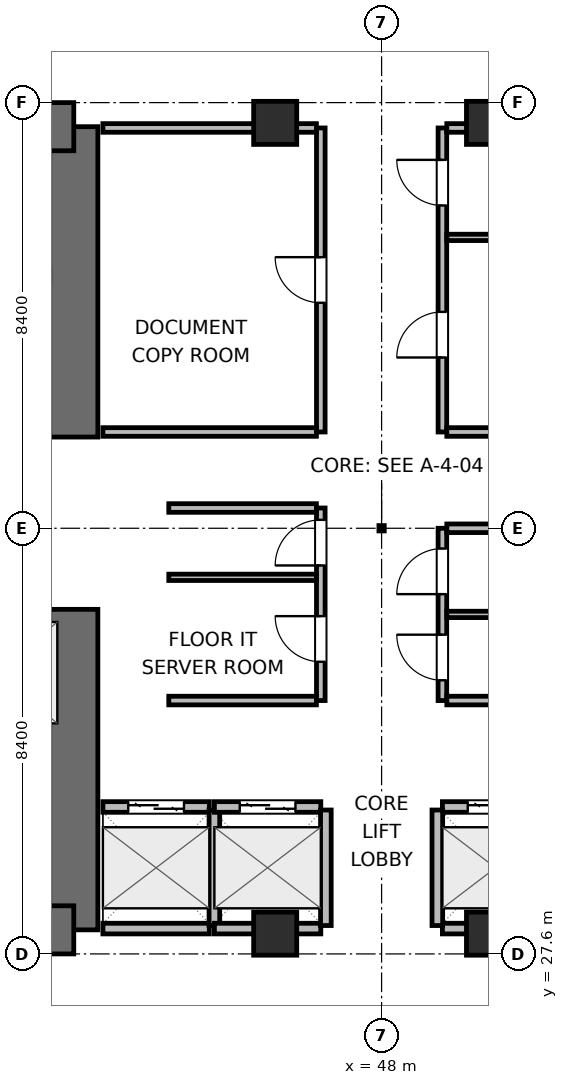
"""IFC4 building model, lengths in metres.
Left out: names, types, materials, properties, quantities, classifications, styles, units other than length and angle.
Written with IfcOpenShell. Run it as: python <this file> out.ifc"""

import sys

from ifc_helpers import new_model, si_unit, direction, frame, frame_2d, origin, origin_2d, place, context, subcontext, project, spatial, rectangle, extrude, element, fill, save


model = new_model("IFC4")
c1 = context("Model", 3, precision=1e-05, world=origin(), true_north=direction((0.0, 1.0)))
c2 = subcontext(c1, "Body", "Model", "MODEL_VIEW")
j1 = project(units=[si_unit("LENGTHUNIT", "METRE"), si_unit("PLANEANGLEUNIT", "RADIAN")], contexts=[c1])
p1 = place(None, origin())
s1 = spatial("IfcSite", under=j1, at=p1, CompositionType="ELEMENT")
p2 = place(p1, origin())
s2 = spatial("IfcBuilding", under=s1, at=p2, CompositionType="ELEMENT")
p3 = place(p2, frame((0.0, 0.0, 45.0)))
s3 = spatial("IfcBuildingStorey", under=s2, at=p3, CompositionType="ELEMENT", Elevation=45.0)
p4 = place(p3, frame((41.925, 28.075, 0.0), z_axis=(0.0, 0.0, 1.0), x_axis=(0.0, 1.0, 0.0)))
e1 = element("IfcWall", 1, at=p4, inside=s3, PredefinedType="SHEAR", context=c2, shape_type="SweptSolid", body=[
    extrude(rectangle(XDim=6.325, YDim=0.95, at=frame_2d((3.163, 0.0))), origin(), (0.0, 0.0, 1.0), 3.9),
])
p5 = place(p3, frame((41.925, 37.8, 0.0), z_axis=(0.0, 0.0, 1.0), x_axis=(0.0, 1.0, 0.0)))
e2 = element("IfcWall", 2, at=p5, inside=s3, PredefinedType="SHEAR", context=c2, shape_type="SweptSolid", body=[
    extrude(rectangle(XDim=6.125, YDim=0.95, at=frame_2d((3.062, 0.0))), origin(), (0.0, 0.0, 1.0), 3.9),
])
p6 = place(p3, frame((32.875, 28.075, 0.0), z_axis=(0.0, 0.0, 1.0), x_axis=(1.0, 0.0, 0.0)))
e3 = element("IfcWall", 3, at=p6, inside=s3, PredefinedType="SHEAR", context=c2, shape_type="SweptSolid", body=[
    extrude(rectangle(XDim=9.05, YDim=0.95, at=frame_2d((4.525, 0.0))), origin(), (0.0, 0.0, 1.0), 3.9),
])
p7 = place(p6, frame((4.975, 0.0, 0.0)))
e4 = element("IfcOpeningElement", 4, at=p7, cuts=e3, PredefinedType="OPENING", context=c2, shape_type="SweptSolid", body=[
    extrude(rectangle(XDim=1.05, YDim=2.04, at=frame_2d((0.525, 1.02))), frame((0.0, 0.485, 0.0), z_axis=(0.0, -1.0, 0.0), x_axis=(1.0, 0.0, 0.0)), (0.0, 0.0, 1.0), 0.97),
])
p8 = place(p3, frame((32.875, 43.925, 0.0), z_axis=(0.0, 0.0, 1.0), x_axis=(1.0, 0.0, 0.0)))
e5 = element("IfcWall", 5, at=p8, inside=s3, PredefinedType="SHEAR", context=c2, shape_type="SweptSolid", body=[
    extrude(rectangle(XDim=9.05, YDim=0.95, at=frame_2d((4.525, 0.0))), origin(), (0.0, 0.0, 1.0), 3.9),
])
p9 = place(p8, frame((0.975, 0.0, 0.0)))
e6 = element("IfcOpeningElement", 6, at=p9, cuts=e5, PredefinedType="OPENING", context=c2, shape_type="SweptSolid", body=[
    extrude(rectangle(XDim=0.95, YDim=2.04, at=frame_2d((0.475, 1.02))), frame((0.0, 0.485, 0.0), z_axis=(0.0, -1.0, 0.0), x_axis=(1.0, 0.0, 0.0)), (0.0, 0.0, 1.0), 0.97),
])
p10 = place(p8, frame((4.225, 0.0, 0.0)))
e7 = element("IfcOpeningElement", 7, at=p10, cuts=e5, PredefinedType="OPENING", context=c2, shape_type="SweptSolid", body=[
    extrude(rectangle(XDim=0.9, YDim=2.02, at=frame_2d((0.45, 1.01))), frame((0.0, 0.485, 0.0), z_axis=(0.0, -1.0, 0.0), x_axis=(1.0, 0.0, 0.0)), (0.0, 0.0, 1.0), 0.97),
])
p11 = place(p8, frame((7.125, 0.0, 0.0)))
e8 = element("IfcOpeningElement", 8, at=p11, cuts=e5, PredefinedType="OPENING", context=c2, shape_type="SweptSolid", body=[
    extrude(rectangle(XDim=0.9, YDim=2.02, at=frame_2d((0.45, 1.01))), frame((0.0, 0.485, 0.0), z_axis=(0.0, -1.0, 0.0), x_axis=(1.0, 0.0, 0.0)), (0.0, 0.0, 1.0), 0.97),
])
for number, where, z_axis, x_axis in (
    (9, (45.9, 28.0, 0.0), (0.0, 0.0, 1.0), (1.0, 0.0, 0.0)),
    (10, (50.1, 28.0, 0.0), (0.0, 0.0, 1.0), (1.0, 0.0, 0.0)),
    (11, (45.9, 44.0, 0.0), (0.0, 0.0, 1.0), (1.0, 0.0, 0.0)),
    (12, (50.1, 44.0, 0.0), (0.0, 0.0, 1.0), (1.0, 0.0, 0.0)),
):
    element("IfcColumn", number, at=place(p3, frame(where, z_axis=z_axis, x_axis=x_axis)), inside=s3, PredefinedType="COLUMN", context=c2, shape_type="SweptSolid", body=[
        extrude(rectangle(XDim=0.85, YDim=0.85, at=origin_2d()), origin(), (0.0, 0.0, 1.0), 3.9),
    ])
p12 = place(p3, frame((42.5, 30.5, 0.0), z_axis=(0.0, 0.0, 1.0), x_axis=(1.0, 0.0, 0.0)))
e13 = element("IfcWall", 13, at=p12, inside=s3, PredefinedType="PARTITIONING", context=c2, shape_type="SweptSolid", body=[
    extrude(rectangle(XDim=2.1, YDim=0.21, at=frame_2d((1.05, 0.0))), origin(), (0.0, 0.0, 1.0), 3.64),
])
p13 = place(p12, frame((0.5, 0.0, 0.0)))
e14 = element("IfcOpeningElement", 14, at=p13, cuts=e13, PredefinedType="OPENING", context=c2, shape_type="SweptSolid", body=[
    extrude(rectangle(XDim=1.1, YDim=2.04, at=frame_2d((0.55, 1.02))), frame((0.0, 0.115, 0.0), z_axis=(0.0, -1.0, 0.0), x_axis=(1.0, 0.0, 0.0)), (0.0, 0.0, 1.0), 0.23),
])
p14 = place(p3, frame((42.5, 28.1, 0.0), z_axis=(0.0, 0.0, 1.0), x_axis=(1.0, 0.0, 0.0)))
e15 = element("IfcWall", 15, at=p14, inside=s3, PredefinedType="PARTITIONING", context=c2, shape_type="SweptSolid", body=[
    extrude(rectangle(XDim=2.1, YDim=0.21, at=frame_2d((1.05, 0.0))), origin(), (0.0, 0.0, 1.0), 2.525),
])
p15 = place(p3, frame((44.7, 28.16, 0.0), z_axis=(0.0, 0.0, 1.0), x_axis=(0.0, 1.0, 0.0)))
e16 = element("IfcWall", 16, at=p15, inside=s3, PredefinedType="PARTITIONING", context=c2, shape_type="SweptSolid", body=[
    extrude(rectangle(XDim=2.28, YDim=0.21, at=frame_2d((1.14, 0.0))), origin(), (0.0, 0.0, 1.0), 3.64),
])
p16 = place(p3, frame((44.7, 30.5, 0.0), z_axis=(0.0, 0.0, 1.0), x_axis=(1.0, 0.0, 0.0)))
e17 = element("IfcWall", 17, at=p16, inside=s3, PredefinedType="PARTITIONING", context=c2, shape_type="SweptSolid", body=[
    extrude(rectangle(XDim=2.1, YDim=0.21, at=frame_2d((1.05, 0.0))), origin(), (0.0, 0.0, 1.0), 3.64),
])
p17 = place(p16, frame((0.5, 0.0, 0.0)))
e18 = element("IfcOpeningElement", 18, at=p17, cuts=e17, PredefinedType="OPENING", context=c2, shape_type="SweptSolid", body=[
    extrude(rectangle(XDim=1.1, YDim=2.04, at=frame_2d((0.55, 1.02))), frame((0.0, 0.115, 0.0), z_axis=(0.0, -1.0, 0.0), x_axis=(1.0, 0.0, 0.0)), (0.0, 0.0, 1.0), 0.23),
])
p18 = place(p3, frame((44.7, 28.1, 0.0), z_axis=(0.0, 0.0, 1.0), x_axis=(1.0, 0.0, 0.0)))
e19 = element("IfcWall", 19, at=p18, inside=s3, PredefinedType="PARTITIONING", context=c2, shape_type="SweptSolid", body=[
    extrude(rectangle(XDim=2.1, YDim=0.21, at=frame_2d((1.05, 0.0))), origin(), (0.0, 0.0, 1.0), 2.525),
])
p19 = place(p3, frame((46.9, 28.16, 0.0), z_axis=(0.0, 0.0, 1.0), x_axis=(0.0, 1.0, 0.0)))
e20 = element("IfcWall", 20, at=p19, inside=s3, PredefinedType="PARTITIONING", context=c2, shape_type="SweptSolid", body=[
    extrude(rectangle(XDim=2.28, YDim=0.21, at=frame_2d((1.14, 0.0))), origin(), (0.0, 0.0, 1.0), 3.64),
])
p20 = place(p3, frame((49.2, 30.5, 0.0), z_axis=(0.0, 0.0, 1.0), x_axis=(1.0, 0.0, 0.0)))
e21 = element("IfcWall", 21, at=p20, inside=s3, PredefinedType="PARTITIONING", context=c2, shape_type="SweptSolid", body=[
    extrude(rectangle(XDim=2.1, YDim=0.21, at=frame_2d((1.05, 0.0))), origin(), (0.0, 0.0, 1.0), 3.64),
])
p21 = place(p20, frame((0.5, 0.0, 0.0)))
e22 = element("IfcOpeningElement", 22, at=p21, cuts=e21, PredefinedType="OPENING", context=c2, shape_type="SweptSolid", body=[
    extrude(rectangle(XDim=1.1, YDim=2.04, at=frame_2d((0.55, 1.02))), frame((0.0, 0.115, 0.0), z_axis=(0.0, -1.0, 0.0), x_axis=(1.0, 0.0, 0.0)), (0.0, 0.0, 1.0), 0.23),
])
p22 = place(p3, frame((49.2, 28.1, 0.0), z_axis=(0.0, 0.0, 1.0), x_axis=(1.0, 0.0, 0.0)))
e23 = element("IfcWall", 23, at=p22, inside=s3, PredefinedType="PARTITIONING", context=c2, shape_type="SweptSolid", body=[
    extrude(rectangle(XDim=2.1, YDim=0.21, at=frame_2d((1.05, 0.0))), origin(), (0.0, 0.0, 1.0), 2.525),
])
p23 = place(p3, frame((49.1, 28.16, 0.0), z_axis=(0.0, 0.0, 1.0), x_axis=(0.0, 1.0, 0.0)))
e24 = element("IfcWall", 24, at=p23, inside=s3, PredefinedType="PARTITIONING", context=c2, shape_type="SweptSolid", body=[
    extrude(rectangle(XDim=2.28, YDim=0.21, at=frame_2d((1.14, 0.0))), origin(), (0.0, 0.0, 1.0), 3.64),
])
p24 = place(p3, frame((46.8, 32.6, 0.0), z_axis=(0.0, 0.0, 1.0), x_axis=(0.0, 1.0, 0.0)))
e25 = element("IfcWall", 25, at=p24, inside=s3, PredefinedType="PARTITIONING", context=c2, shape_type="SweptSolid", body=[
    extrude(rectangle(XDim=3.8, YDim=0.17, at=frame_2d((1.9, 0.0))), origin(), (0.0, 0.0, 1.0), 3.64),
])
p25 = place(p24, frame((0.766, 0.0, 0.0)))
e26 = element("IfcOpeningElement", 26, at=p25, cuts=e25, PredefinedType="OPENING", context=c2, shape_type="SweptSolid", body=[
    extrude(rectangle(XDim=0.9, YDim=2.02, at=frame_2d((0.45, 1.01))), frame((0.0, 0.095, 0.0), z_axis=(0.0, -1.0, 0.0), x_axis=(1.0, 0.0, 0.0)), (0.0, 0.0, 1.0), 0.19),
])
p26 = place(p24, frame((2.666, 0.0, 0.0)))
e27 = element("IfcOpeningElement", 27, at=p26, cuts=e25, PredefinedType="OPENING", context=c2, shape_type="SweptSolid", body=[
    extrude(rectangle(XDim=0.9, YDim=2.02, at=frame_2d((0.45, 1.01))), frame((0.0, 0.095, 0.0), z_axis=(0.0, -1.0, 0.0), x_axis=(1.0, 0.0, 0.0)), (0.0, 0.0, 1.0), 0.19),
])
for number, where, z_axis, x_axis in (
    (28, (43.8, 32.6, 0.0), (0.0, 0.0, 1.0), (1.0, 0.0, 0.0)),
    (29, (43.8, 36.4, 0.0), (0.0, 0.0, 1.0), (1.0, 0.0, 0.0)),
):
    element("IfcWall", number, at=place(p3, frame(where, z_axis=z_axis, x_axis=x_axis)), inside=s3, PredefinedType="PARTITIONING", context=c2, shape_type="SweptSolid", body=[
        extrude(rectangle(XDim=2.913, YDim=0.17, at=frame_2d((1.457, 0.0))), origin(), (0.0, 0.0, 1.0), 3.64),
    ])
p27 = place(p3, frame((43.8, 35.032, 0.0), z_axis=(0.0, 0.0, 1.0), x_axis=(1.0, 0.0, 0.0)))
e30 = element("IfcWall", 30, at=p27, inside=s3, PredefinedType="PARTITIONING", context=c2, shape_type="SweptSolid", body=[
    extrude(rectangle(XDim=2.913, YDim=0.125, at=frame_2d((1.457, 0.0))), origin(), (0.0, 0.0, 1.0), 3.64),
])
p28 = place(p3, frame((49.2, 32.6, 0.0), z_axis=(0.0, 0.0, 1.0), x_axis=(0.0, 1.0, 0.0)))
e31 = element("IfcWall", 31, at=p28, inside=s3, PredefinedType="PARTITIONING", context=c2, shape_type="SweptSolid", body=[
    extrude(rectangle(XDim=3.4, YDim=0.17, at=frame_2d((1.7, 0.0))), origin(), (0.0, 0.0, 1.0), 3.64),
])
p29 = place(p28, frame((0.4, 0.0, 0.0)))
e32 = element("IfcOpeningElement", 32, at=p29, cuts=e31, PredefinedType="OPENING", context=c2, shape_type="SweptSolid", body=[
    extrude(rectangle(XDim=0.9, YDim=2.02, at=frame_2d((0.45, 1.01))), frame((0.0, 0.095, 0.0), z_axis=(0.0, -1.0, 0.0), x_axis=(1.0, 0.0, 0.0)), (0.0, 0.0, 1.0), 0.19),
])
p30 = place(p28, frame((2.1, 0.0, 0.0)))
e33 = element("IfcOpeningElement", 33, at=p30, cuts=e31, PredefinedType="OPENING", context=c2, shape_type="SweptSolid", body=[
    extrude(rectangle(XDim=0.9, YDim=2.02, at=frame_2d((0.45, 1.01))), frame((0.0, 0.095, 0.0), z_axis=(0.0, -1.0, 0.0), x_axis=(1.0, 0.0, 0.0)), (0.0, 0.0, 1.0), 0.19),
])
for number, where, z_axis, x_axis in (
    (34, (49.287, 32.6, 0.0), (0.0, 0.0, 1.0), (1.0, 0.0, 0.0)),
    (35, (49.287, 36.0, 0.0), (0.0, 0.0, 1.0), (1.0, 0.0, 0.0)),
):
    element("IfcWall", number, at=place(p3, frame(where, z_axis=z_axis, x_axis=x_axis)), inside=s3, PredefinedType="PARTITIONING", context=c2, shape_type="SweptSolid", body=[
        extrude(rectangle(XDim=2.913, YDim=0.17, at=frame_2d((1.457, 0.0))), origin(), (0.0, 0.0, 1.0), 3.64),
    ])
p31 = place(p3, frame((49.287, 34.3, 0.0), z_axis=(0.0, 0.0, 1.0), x_axis=(1.0, 0.0, 0.0)))
e36 = element("IfcWall", 36, at=p31, inside=s3, PredefinedType="PARTITIONING", context=c2, shape_type="SweptSolid", body=[
    extrude(rectangle(XDim=2.913, YDim=0.125, at=frame_2d((1.457, 0.0))), origin(), (0.0, 0.0, 1.0), 3.64),
])
p32 = place(p3, frame((46.8, 37.9, 0.0), z_axis=(0.0, 0.0, 1.0), x_axis=(0.0, 1.0, 0.0)))
e37 = element("IfcWall", 37, at=p32, inside=s3, PredefinedType="PARTITIONING", context=c2, shape_type="SweptSolid", body=[
    extrude(rectangle(XDim=6.0, YDim=0.17, at=frame_2d((3.0, 0.0))), origin(), (0.0, 0.0, 1.0), 3.64),
])
p33 = place(p32, frame((2.55, 0.0, 0.0)))
e38 = element("IfcOpeningElement", 38, at=p33, cuts=e37, PredefinedType="OPENING", context=c2, shape_type="SweptSolid", body=[
    extrude(rectangle(XDim=0.9, YDim=2.02, at=frame_2d((0.45, 1.01))), frame((0.0, 0.095, 0.0), z_axis=(0.0, -1.0, 0.0), x_axis=(1.0, 0.0, 0.0)), (0.0, 0.0, 1.0), 0.19),
])
p34 = place(p3, frame((42.5, 37.9, 0.0), z_axis=(0.0, 0.0, 1.0), x_axis=(1.0, 0.0, 0.0)))
e39 = element("IfcWall", 39, at=p34, inside=s3, PredefinedType="PARTITIONING", context=c2, shape_type="SweptSolid", body=[
    extrude(rectangle(XDim=4.213, YDim=0.17, at=frame_2d((2.106, 0.0))), origin(), (0.0, 0.0, 1.0), 3.64),
])
p35 = place(p3, frame((42.5, 43.9, 0.0), z_axis=(0.0, 0.0, 1.0), x_axis=(1.0, 0.0, 0.0)))
e40 = element("IfcWall", 40, at=p35, inside=s3, PredefinedType="PARTITIONING", context=c2, shape_type="SweptSolid", body=[
    extrude(rectangle(XDim=4.213, YDim=0.17, at=frame_2d((2.106, 0.0))), origin(), (0.0, 0.0, 1.0), 2.525),
])
p36 = place(p3, frame((49.2, 37.9, 0.0), z_axis=(0.0, 0.0, 1.0), x_axis=(0.0, 1.0, 0.0)))
e41 = element("IfcWall", 41, at=p36, inside=s3, PredefinedType="PARTITIONING", context=c2, shape_type="SweptSolid", body=[
    extrude(rectangle(XDim=6.0, YDim=0.17, at=frame_2d((3.0, 0.0))), origin(), (0.0, 0.0, 1.0), 3.64),
])
p37 = place(p36, frame((1.47, 0.0, 0.0)))
e42 = element("IfcOpeningElement", 42, at=p37, cuts=e41, PredefinedType="OPENING", context=c2, shape_type="SweptSolid", body=[
    extrude(rectangle(XDim=0.9, YDim=2.02, at=frame_2d((0.45, 1.01))), frame((0.0, 0.095, 0.0), z_axis=(0.0, -1.0, 0.0), x_axis=(1.0, 0.0, 0.0)), (0.0, 0.0, 1.0), 0.19),
])
p38 = place(p36, frame((4.47, 0.0, 0.0)))
e43 = element("IfcOpeningElement", 43, at=p38, cuts=e41, PredefinedType="OPENING", context=c2, shape_type="SweptSolid", body=[
    extrude(rectangle(XDim=0.9, YDim=2.02, at=frame_2d((0.45, 1.01))), frame((0.0, 0.095, 0.0), z_axis=(0.0, -1.0, 0.0), x_axis=(1.0, 0.0, 0.0)), (0.0, 0.0, 1.0), 0.19),
])
p39 = place(p3, frame((49.287, 37.9, 0.0), z_axis=(0.0, 0.0, 1.0), x_axis=(1.0, 0.0, 0.0)))
e44 = element("IfcWall", 44, at=p39, inside=s3, PredefinedType="PARTITIONING", context=c2, shape_type="SweptSolid", body=[
    extrude(rectangle(XDim=4.113, YDim=0.17, at=frame_2d((2.056, 0.0))), origin(), (0.0, 0.0, 1.0), 3.64),
])
p40 = place(p3, frame((49.287, 43.9, 0.0), z_axis=(0.0, 0.0, 1.0), x_axis=(1.0, 0.0, 0.0)))
e45 = element("IfcWall", 45, at=p40, inside=s3, PredefinedType="PARTITIONING", context=c2, shape_type="SweptSolid", body=[
    extrude(rectangle(XDim=4.113, YDim=0.17, at=frame_2d((2.056, 0.0))), origin(), (0.0, 0.0, 1.0), 2.525),
])
p41 = place(p3, frame((49.287, 41.74, 0.0), z_axis=(0.0, 0.0, 1.0), x_axis=(1.0, 0.0, 0.0)))
e46 = element("IfcWall", 46, at=p41, inside=s3, PredefinedType="PARTITIONING", context=c2, shape_type="SweptSolid", body=[
    extrude(rectangle(XDim=4.113, YDim=0.125, at=frame_2d((2.056, 0.0))), origin(), (0.0, 0.0, 1.0), 3.64),
])
p42 = place(p13, origin())
e47 = element("IfcDoor", 47, at=p42, inside=s3, OperationType="DOUBLE_DOOR_SLIDING", PredefinedType="DOOR", context=c2, shape_type="SweptSolid", body=[
    extrude(rectangle(XDim=1.1, YDim=2.04, at=frame_2d((0.55, 1.02))), frame((0.0, 0.025, 0.0), z_axis=(0.0, -1.0, 0.0), x_axis=(1.0, 0.0, 0.0)), (0.0, 0.0, 1.0), 0.05),
])
fill(e14, e47)
p43 = place(p17, origin())
e48 = element("IfcDoor", 48, at=p43, inside=s3, OperationType="DOUBLE_DOOR_SLIDING", PredefinedType="DOOR", context=c2, shape_type="SweptSolid", body=[
    extrude(rectangle(XDim=1.1, YDim=2.04, at=frame_2d((0.55, 1.02))), frame((0.0, 0.025, 0.0), z_axis=(0.0, -1.0, 0.0), x_axis=(1.0, 0.0, 0.0)), (0.0, 0.0, 1.0), 0.05),
])
fill(e18, e48)
p44 = place(p21, origin())
e49 = element("IfcDoor", 49, at=p44, inside=s3, OperationType="DOUBLE_DOOR_SLIDING", PredefinedType="DOOR", context=c2, shape_type="SweptSolid", body=[
    extrude(rectangle(XDim=1.1, YDim=2.04, at=frame_2d((0.55, 1.02))), frame((0.0, 0.025, 0.0), z_axis=(0.0, -1.0, 0.0), x_axis=(1.0, 0.0, 0.0)), (0.0, 0.0, 1.0), 0.05),
])
fill(e22, e49)
p45 = place(p25, origin())
e50 = element("IfcDoor", 50, at=p45, inside=s3, OperationType="SINGLE_SWING_RIGHT", PredefinedType="DOOR", context=c2, shape_type="SweptSolid", body=[
    extrude(rectangle(XDim=0.9, YDim=2.02, at=frame_2d((0.45, 1.01))), frame((0.0, 0.025, 0.0), z_axis=(0.0, -1.0, 0.0), x_axis=(1.0, 0.0, 0.0)), (0.0, 0.0, 1.0), 0.05),
])
fill(e26, e50)
p46 = place(p26, origin())
e51 = element("IfcDoor", 51, at=p46, inside=s3, OperationType="SINGLE_SWING_LEFT", PredefinedType="DOOR", context=c2, shape_type="SweptSolid", body=[
    extrude(rectangle(XDim=0.9, YDim=2.02, at=frame_2d((0.45, 1.01))), frame((0.0, 0.025, 0.0), z_axis=(0.0, -1.0, 0.0), x_axis=(1.0, 0.0, 0.0)), (0.0, 0.0, 1.0), 0.05),
])
fill(e27, e51)
p47 = place(p29, origin())
e52 = element("IfcDoor", 52, at=p47, inside=s3, OperationType="SINGLE_SWING_RIGHT", PredefinedType="DOOR", context=c2, shape_type="SweptSolid", body=[
    extrude(rectangle(XDim=0.9, YDim=2.02, at=frame_2d((0.45, 1.01))), frame((0.0, 0.025, 0.0), z_axis=(0.0, -1.0, 0.0), x_axis=(1.0, 0.0, 0.0)), (0.0, 0.0, 1.0), 0.05),
])
fill(e32, e52)
p48 = place(p30, origin())
e53 = element("IfcDoor", 53, at=p48, inside=s3, OperationType="SINGLE_SWING_LEFT", PredefinedType="DOOR", context=c2, shape_type="SweptSolid", body=[
    extrude(rectangle(XDim=0.9, YDim=2.02, at=frame_2d((0.45, 1.01))), frame((0.0, 0.025, 0.0), z_axis=(0.0, -1.0, 0.0), x_axis=(1.0, 0.0, 0.0)), (0.0, 0.0, 1.0), 0.05),
])
fill(e33, e53)
p49 = place(p33, origin())
e54 = element("IfcDoor", 54, at=p49, inside=s3, OperationType="SINGLE_SWING_RIGHT", PredefinedType="DOOR", context=c2, shape_type="SweptSolid", body=[
    extrude(rectangle(XDim=0.9, YDim=2.02, at=frame_2d((0.45, 1.01))), frame((0.0, 0.025, 0.0), z_axis=(0.0, -1.0, 0.0), x_axis=(1.0, 0.0, 0.0)), (0.0, 0.0, 1.0), 0.05),
])
fill(e38, e54)
p50 = place(p37, origin())
e55 = element("IfcDoor", 55, at=p50, inside=s3, OperationType="SINGLE_SWING_LEFT", PredefinedType="DOOR", context=c2, shape_type="SweptSolid", body=[
    extrude(rectangle(XDim=0.9, YDim=2.02, at=frame_2d((0.45, 1.01))), frame((0.0, 0.025, 0.0), z_axis=(0.0, -1.0, 0.0), x_axis=(1.0, 0.0, 0.0)), (0.0, 0.0, 1.0), 0.05),
])
fill(e42, e55)
p51 = place(p38, origin())
e56 = element("IfcDoor", 56, at=p51, inside=s3, OperationType="SINGLE_SWING_RIGHT", PredefinedType="DOOR", context=c2, shape_type="SweptSolid", body=[
    extrude(rectangle(XDim=0.9, YDim=2.02, at=frame_2d((0.45, 1.01))), frame((0.0, 0.025, 0.0), z_axis=(0.0, -1.0, 0.0), x_axis=(1.0, 0.0, 0.0)), (0.0, 0.0, 1.0), 0.05),
])
fill(e43, e56)
save(model, sys.argv[1])
